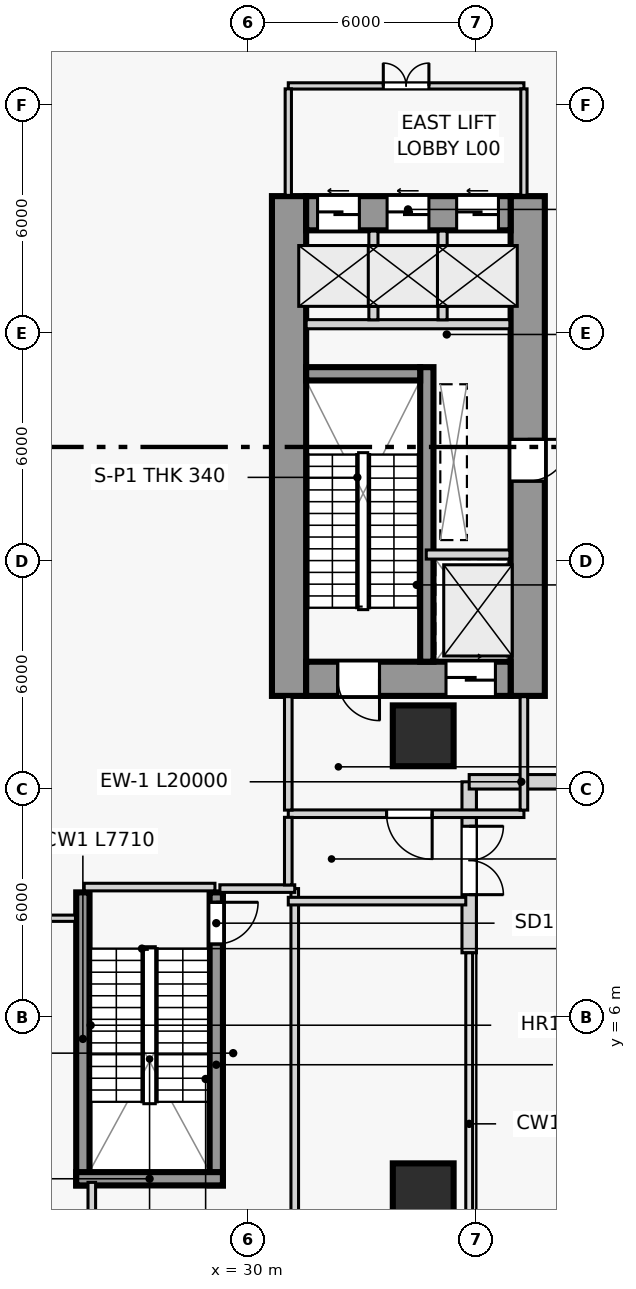
"""IFC4 building model, lengths in metres.
Left out: names, types, materials, properties, quantities, classifications, styles, units other than length and angle.
Written with IfcOpenShell. Run it as: python <this file> out.ifc"""

import sys

from ifc_helpers import new_model, si_unit, direction, frame, frame_2d, origin, origin_2d, place, context, subcontext, project, spatial, rectangle, extrude, source, transform, mapped, element, fill, save


model = new_model("IFC4")
c1 = context("Model", 3, precision=1e-05, world=origin(), true_north=direction((0.0, 1.0)))
c2 = subcontext(c1, "Body", "Model", "MODEL_VIEW")
j1 = project(units=[si_unit("LENGTHUNIT", "METRE"), si_unit("PLANEANGLEUNIT", "RADIAN")], contexts=[c1])
p1 = place(None, origin())
s1 = spatial("IfcSite", under=j1, at=p1, CompositionType="ELEMENT")
p2 = place(p1, origin())
s2 = spatial("IfcBuilding", under=s1, at=p2, CompositionType="ELEMENT")
p3 = place(p2, origin())
s3 = spatial("IfcBuildingStorey", under=s2, at=p3, CompositionType="ELEMENT", Elevation=0.0)
p4 = place(p3, frame((31.07, 14.45, 0.0), z_axis=(0.0, 0.0, 1.0), x_axis=(0.0, 1.0, 0.0)))
e1 = element("IfcWall", 1, at=p4, inside=s3, PredefinedType="SHEAR", context=c2, shape_type="SweptSolid", body=[
    extrude(rectangle(XDim=13.15, YDim=0.9, at=frame_2d((6.575, 0.0))), origin(), (0.0, 0.0, 1.0), 4.5),
])
p5 = place(p3, frame((37.35, 14.45, 0.0), z_axis=(0.0, 0.0, 1.0), x_axis=(0.0, 1.0, 0.0)))
e2 = element("IfcWall", 2, at=p5, inside=s3, PredefinedType="SHEAR", context=c2, shape_type="SweptSolid", body=[
    extrude(rectangle(XDim=13.15, YDim=0.9, at=frame_2d((6.575, 0.0))), origin(), (0.0, 0.0, 1.0), 4.5),
])
p6 = place(p5, frame((5.65, 0.0, 0.0)))
e3 = element("IfcOpeningElement", 3, at=p6, cuts=e2, PredefinedType="OPENING", context=c2, shape_type="SweptSolid", body=[
    extrude(rectangle(XDim=1.1, YDim=2.2, at=frame_2d((0.55, 1.1))), frame((0.0, 0.46, 0.0), z_axis=(0.0, -1.0, 0.0), x_axis=(1.0, 0.0, 0.0)), (0.0, 0.0, 1.0), 0.92),
])
p7 = place(p3, frame((31.52, 14.9, 0.0), z_axis=(0.0, 0.0, 1.0), x_axis=(1.0, 0.0, 0.0)))
e4 = element("IfcWall", 4, at=p7, inside=s3, PredefinedType="SHEAR", context=c2, shape_type="SweptSolid", body=[
    extrude(rectangle(XDim=5.38, YDim=0.9, at=frame_2d((2.69, 0.0))), origin(), (0.0, 0.0, 1.0), 4.5),
])
p8 = place(p7, frame((0.83, 0.0, 0.0)))
e5 = element("IfcOpeningElement", 5, at=p8, cuts=e4, PredefinedType="OPENING", context=c2, shape_type="SweptSolid", body=[
    extrude(rectangle(XDim=1.1, YDim=2.2, at=frame_2d((0.55, 1.1))), frame((0.0, 0.46, 0.0), z_axis=(0.0, -1.0, 0.0), x_axis=(1.0, 0.0, 0.0)), (0.0, 0.0, 1.0), 0.92),
])
p9 = place(p7, frame((3.68, 0.0, 0.0)))
e6 = element("IfcOpeningElement", 6, at=p9, cuts=e4, PredefinedType="OPENING", context=c2, shape_type="SweptSolid", body=[
    extrude(rectangle(XDim=1.3, YDim=2.2, at=frame_2d((0.65, 1.1))), frame((0.0, 0.46, 0.0), z_axis=(0.0, -1.0, 0.0), x_axis=(1.0, 0.0, 0.0)), (0.0, 0.0, 1.0), 0.92),
])
p10 = place(p3, frame((31.52, 27.15, 0.0), z_axis=(0.0, 0.0, 1.0), x_axis=(1.0, 0.0, 0.0)))
e7 = element("IfcWall", 7, at=p10, inside=s3, PredefinedType="SHEAR", context=c2, shape_type="SweptSolid", body=[
    extrude(rectangle(XDim=5.38, YDim=0.9, at=frame_2d((2.69, 0.0))), origin(), (0.0, 0.0, 1.0), 4.5),
])
p11 = place(p10, frame((0.3, 0.0, 0.0)))
e8 = element("IfcOpeningElement", 8, at=p11, cuts=e7, PredefinedType="OPENING", context=c2, shape_type="SweptSolid", body=[
    extrude(rectangle(XDim=1.1, YDim=2.2, at=frame_2d((0.55, 1.1))), frame((0.0, 0.46, 0.0), z_axis=(0.0, -1.0, 0.0), x_axis=(1.0, 0.0, 0.0)), (0.0, 0.0, 1.0), 0.92),
])
p12 = place(p10, frame((2.13, 0.0, 0.0)))
e9 = element("IfcOpeningElement", 9, at=p12, cuts=e7, PredefinedType="OPENING", context=c2, shape_type="SweptSolid", body=[
    extrude(rectangle(XDim=1.1, YDim=2.2, at=frame_2d((0.55, 1.1))), frame((0.0, 0.46, 0.0), z_axis=(0.0, -1.0, 0.0), x_axis=(1.0, 0.0, 0.0)), (0.0, 0.0, 1.0), 0.92),
])
p13 = place(p10, frame((3.96, 0.0, 0.0)))
e10 = element("IfcOpeningElement", 10, at=p13, cuts=e7, PredefinedType="OPENING", context=c2, shape_type="SweptSolid", body=[
    extrude(rectangle(XDim=1.1, YDim=2.2, at=frame_2d((0.55, 1.1))), frame((0.0, 0.46, 0.0), z_axis=(0.0, -1.0, 0.0), x_axis=(1.0, 0.0, 0.0)), (0.0, 0.0, 1.0), 0.92),
])
p14 = place(p3, frame((34.695, 15.35, 0.0), z_axis=(0.0, 0.0, 1.0), x_axis=(0.0, 1.0, 0.0)))
e11 = element("IfcWall", 11, at=p14, inside=s3, PredefinedType="SHEAR", context=c2, shape_type="SweptSolid", body=[
    extrude(rectangle(XDim=7.75, YDim=0.35, at=frame_2d((3.875, 0.0))), origin(), (0.0, 0.0, 1.0), 4.5),
])
p15 = place(p3, frame((31.52, 22.925, 0.0), z_axis=(0.0, 0.0, 1.0), x_axis=(1.0, 0.0, 0.0)))
e12 = element("IfcWall", 12, at=p15, inside=s3, PredefinedType="SHEAR", context=c2, shape_type="SweptSolid", body=[
    extrude(rectangle(XDim=3.0, YDim=0.35, at=frame_2d((1.5, 0.0))), origin(), (0.0, 0.0, 1.0), 4.5),
])
p16 = place(p3, frame((25.645, 1.57, 0.0), z_axis=(0.0, 0.0, 1.0), x_axis=(0.0, 1.0, 0.0)))
e13 = element("IfcWall", 13, at=p16, inside=s3, PredefinedType="SHEAR", context=c2, shape_type="SweptSolid", body=[
    extrude(rectangle(XDim=7.71, YDim=0.35, at=frame_2d((3.855, 0.0))), origin(), (0.0, 0.0, 1.0), 4.5),
])
p17 = place(p3, frame((29.155, 1.57, 0.0), z_axis=(0.0, 0.0, 1.0), x_axis=(0.0, 1.0, 0.0)))
e14 = element("IfcWall", 14, at=p17, inside=s3, PredefinedType="SHEAR", context=c2, shape_type="SweptSolid", body=[
    extrude(rectangle(XDim=7.71, YDim=0.35, at=frame_2d((3.855, 0.0))), origin(), (0.0, 0.0, 1.0), 4.5),
])
p18 = place(p17, frame((6.35, 0.0, 0.0)))
e15 = element("IfcOpeningElement", 15, at=p18, cuts=e14, PredefinedType="OPENING", context=c2, shape_type="SweptSolid", body=[
    extrude(rectangle(XDim=1.1, YDim=2.2, at=frame_2d((0.55, 1.1))), frame((0.0, 0.185, 0.0), z_axis=(0.0, -1.0, 0.0), x_axis=(1.0, 0.0, 0.0)), (0.0, 0.0, 1.0), 0.37),
])
p19 = place(p3, frame((25.47, 1.745, 0.0), z_axis=(0.0, 0.0, 1.0), x_axis=(1.0, 0.0, 0.0)))
e16 = element("IfcWall", 16, at=p19, inside=s3, PredefinedType="SHEAR", context=c2, shape_type="SweptSolid", body=[
    extrude(rectangle(XDim=3.86, YDim=0.35, at=frame_2d((1.93, 0.0))), origin(), (0.0, 0.0, 1.0), 4.5),
])
m1 = source(origin(), c2, "Body", "SweptSolid", [
    extrude(rectangle(XDim=1.6, YDim=1.6, at=origin_2d()), origin(), (0.0, 0.0, 1.0), 4.5),
])
for number, where, z_axis, x_axis in (
    (17, (34.6, 1.35, 0.0), (0.0, 0.0, 1.0), (1.0, 0.0, 0.0)),
    (18, (34.6, 13.4, 0.0), (0.0, 0.0, 1.0), (1.0, 0.0, 0.0)),
):
    element("IfcColumn", number, at=place(p3, frame(where, z_axis=z_axis, x_axis=x_axis)), inside=s3, PredefinedType="COLUMN", context=c2, shape_type="MappedRepresentation", body=[
        mapped(m1, transform((0.0, 0.0, 0.0), scale=1.0)),
    ])
p20 = place(p3, frame((35.81, 7.69, 0.0), z_axis=(0.0, 0.0, 1.0), x_axis=(0.0, 1.0, 0.0)))
e19 = element("IfcWall", 19, at=p20, inside=s3, PredefinedType="SOLIDWALL", context=c2, shape_type="SweptSolid", body=[
    extrude(rectangle(XDim=4.5, YDim=0.38, at=frame_2d((2.25, 0.0))), origin(), (0.0, 0.0, 1.0), 4.16),
])
p21 = place(p20, frame((1.53, 0.0, 0.0)))
e20 = element("IfcOpeningElement", 20, at=p21, cuts=e19, PredefinedType="OPENING", context=c2, shape_type="SweptSolid", body=[
    extrude(rectangle(XDim=1.8, YDim=2.4, at=frame_2d((0.9, 1.2))), frame((0.0, 0.2, 0.0), z_axis=(0.0, -1.0, 0.0), x_axis=(1.0, 0.0, 0.0)), (0.0, 0.0, 1.0), 0.4),
])
p22 = place(p3, frame((35.81, 12.19, 0.0), z_axis=(0.0, 0.0, 1.0), x_axis=(1.0, 0.0, 0.0)))
e21 = element("IfcWall", 21, at=p22, inside=s3, PredefinedType="SOLIDWALL", context=c2, shape_type="SweptSolid", body=[
    extrude(rectangle(XDim=20.0, YDim=0.38, at=frame_2d((10.0, 0.0))), origin(), (0.0, 0.0, 1.0), 4.16),
])
p23 = place(p22, frame((2.742, 0.0, 0.8)))
e22 = element("IfcOpeningElement", 22, at=p23, cuts=e21, PredefinedType="OPENING", context=c2, shape_type="SweptSolid", body=[
    extrude(rectangle(XDim=2.4, YDim=2.1, at=frame_2d((1.2, 1.05))), frame((0.0, 0.2, 0.0), z_axis=(0.0, -1.0, 0.0), x_axis=(1.0, 0.0, 0.0)), (0.0, 0.0, 1.0), 0.4),
])
p24 = place(p22, frame((7.228, 0.0, 0.8)))
e23 = element("IfcOpeningElement", 23, at=p24, cuts=e21, PredefinedType="OPENING", context=c2, shape_type="SweptSolid", body=[
    extrude(rectangle(XDim=2.4, YDim=2.1, at=frame_2d((1.2, 1.05))), frame((0.0, 0.2, 0.0), z_axis=(0.0, -1.0, 0.0), x_axis=(1.0, 0.0, 0.0)), (0.0, 0.0, 1.0), 0.4),
])
p25 = place(p22, frame((11.712, 0.0, 0.8)))
e24 = element("IfcOpeningElement", 24, at=p25, cuts=e21, PredefinedType="OPENING", context=c2, shape_type="SweptSolid", body=[
    extrude(rectangle(XDim=2.4, YDim=2.1, at=frame_2d((1.2, 1.05))), frame((0.0, 0.2, 0.0), z_axis=(0.0, -1.0, 0.0), x_axis=(1.0, 0.0, 0.0)), (0.0, 0.0, 1.0), 0.4),
])
p26 = place(p22, frame((16.198, 0.0, 0.8)))
e25 = element("IfcOpeningElement", 25, at=p26, cuts=e21, PredefinedType="OPENING", context=c2, shape_type="SweptSolid", body=[
    extrude(rectangle(XDim=2.4, YDim=2.1, at=frame_2d((1.2, 1.05))), frame((0.0, 0.2, 0.0), z_axis=(0.0, -1.0, 0.0), x_axis=(1.0, 0.0, 0.0)), (0.0, 0.0, 1.0), 0.4),
])
p27 = place(p3, frame((34.68, 18.17, 0.0), z_axis=(0.0, 0.0, 1.0), x_axis=(1.0, 0.0, 0.0)))
e26 = element("IfcWall", 26, at=p27, inside=s3, PredefinedType="PARTITIONING", context=c2, shape_type="SweptSolid", body=[
    extrude(rectangle(XDim=2.2, YDim=0.24, at=frame_2d((1.1, 0.0))), origin(), (0.0, 0.0, 1.0), 4.16),
])
p28 = place(p3, frame((31.05, 11.35, 0.0), z_axis=(0.0, 0.0, 1.0), x_axis=(1.0, 0.0, 0.0)))
e27 = element("IfcWall", 27, at=p28, inside=s3, PredefinedType="PARTITIONING", context=c2, shape_type="SweptSolid", body=[
    extrude(rectangle(XDim=6.2, YDim=0.2, at=frame_2d((3.1, 0.0))), origin(), (0.0, 0.0, 1.0), 4.16),
])
p29 = place(p28, frame((2.586, 0.0, 0.0)))
e28 = element("IfcOpeningElement", 28, at=p29, cuts=e27, PredefinedType="OPENING", context=c2, shape_type="SweptSolid", body=[
    extrude(rectangle(XDim=1.2, YDim=2.2, at=frame_2d((0.6, 1.1))), frame((0.0, 0.11, 0.0), z_axis=(0.0, -1.0, 0.0), x_axis=(1.0, 0.0, 0.0)), (0.0, 0.0, 1.0), 0.22),
])
for number, where, z_axis, x_axis in (
    (29, (31.05, 11.445, 0.0), (0.0, 0.0, 1.0), (0.0, 1.0, 0.0)),
    (30, (37.25, 11.445, 0.0), (0.0, 0.0, 1.0), (0.0, 1.0, 0.0)),
):
    element("IfcWall", number, at=place(p3, frame(where, z_axis=z_axis, x_axis=x_axis)), inside=s3, PredefinedType="PARTITIONING", context=c2, shape_type="SweptSolid", body=[
        extrude(rectangle(XDim=2.985, YDim=0.2, at=frame_2d((1.492, 0.0))), origin(), (0.0, 0.0, 1.0), 4.16),
    ])
p30 = place(p3, frame((31.52, 24.23, 0.0), z_axis=(0.0, 0.0, 1.0), x_axis=(1.0, 0.0, 0.0)))
e31 = element("IfcWall", 31, at=p30, inside=s3, PredefinedType="PARTITIONING", context=c2, shape_type="SweptSolid", body=[
    extrude(rectangle(XDim=5.36, YDim=0.24, at=frame_2d((2.68, 0.0))), origin(), (0.0, 0.0, 1.0), 4.16),
])
for number, where, z_axis, x_axis in (
    (32, (33.29, 24.345, 0.0), (0.0, 0.0, 1.0), (0.0, 1.0, 0.0)),
    (33, (35.11, 24.345, 0.0), (0.0, 0.0, 1.0), (0.0, 1.0, 0.0)),
):
    element("IfcWall", number, at=place(p3, frame(where, z_axis=z_axis, x_axis=x_axis)), inside=s3, PredefinedType="PARTITIONING", context=c2, shape_type="SweptSolid", body=[
        extrude(rectangle(XDim=2.335, YDim=0.24, at=frame_2d((1.167, 0.0))), origin(), (0.0, 0.0, 1.0), 4.16),
    ])
p31 = place(p3, frame((31.05, 30.5, 0.0), z_axis=(0.0, 0.0, 1.0), x_axis=(1.0, 0.0, 0.0)))
e34 = element("IfcWall", 34, at=p31, inside=s3, PredefinedType="PARTITIONING", context=c2, shape_type="SweptSolid", body=[
    extrude(rectangle(XDim=6.2, YDim=0.165, at=frame_2d((3.1, 0.0))), origin(), (0.0, 0.0, 1.0), 4.16),
])
p32 = place(p31, frame((2.5, 0.0, 0.0)))
e35 = element("IfcOpeningElement", 35, at=p32, cuts=e34, PredefinedType="OPENING", context=c2, shape_type="SweptSolid", body=[
    extrude(rectangle(XDim=1.2, YDim=2.2, at=frame_2d((0.6, 1.1))), frame((0.0, 0.093, 0.0), z_axis=(0.0, -1.0, 0.0), x_axis=(1.0, 0.0, 0.0)), (0.0, 0.0, 1.0), 0.185),
])
for number, where, z_axis, x_axis in (
    (36, (31.05, 27.62, 0.0), (0.0, 0.0, 1.0), (0.0, 1.0, 0.0)),
    (37, (37.25, 27.62, 0.0), (0.0, 0.0, 1.0), (0.0, 1.0, 0.0)),
):
    element("IfcWall", number, at=place(p3, frame(where, z_axis=z_axis, x_axis=x_axis)), inside=s3, PredefinedType="PARTITIONING", context=c2, shape_type="SweptSolid", body=[
        extrude(rectangle(XDim=2.802, YDim=0.165, at=frame_2d((1.401, 0.0))), origin(), (0.0, 0.0, 1.0), 4.16),
    ])
p33 = place(p3, frame((25.68, 9.42, 0.0), z_axis=(0.0, 0.0, 1.0), x_axis=(1.0, 0.0, 0.0)))
e38 = element("IfcWall", 38, at=p33, inside=s3, PredefinedType="PARTITIONING", context=c2, shape_type="SweptSolid", body=[
    extrude(rectangle(XDim=3.44, YDim=0.2, at=frame_2d((1.72, 0.0))), origin(), (0.0, 0.0, 1.0), 4.16),
])
p34 = place(p3, frame((15.3, 8.6, 0.0), z_axis=(0.0, 0.0, 1.0), x_axis=(1.0, 0.0, 0.0)))
e39 = element("IfcWall", 39, at=p34, inside=s3, PredefinedType="PARTITIONING", context=c2, shape_type="SweptSolid", body=[
    extrude(rectangle(XDim=10.15, YDim=0.165, at=frame_2d((5.075, 0.0))), origin(), (0.0, 0.0, 1.0), 4.16),
])
p35 = place(p34, frame((4.475, 0.0, 0.0)))
e40 = element("IfcOpeningElement", 40, at=p35, cuts=e39, PredefinedType="OPENING", context=c2, shape_type="SweptSolid", body=[
    extrude(rectangle(XDim=1.2, YDim=2.2, at=frame_2d((0.6, 1.1))), frame((0.0, 0.093, 0.0), z_axis=(0.0, -1.0, 0.0), x_axis=(1.0, 0.0, 0.0)), (0.0, 0.0, 1.0), 0.185),
])
p36 = place(p3, frame((25.88, -5.55, 0.0), z_axis=(0.0, 0.0, 1.0), x_axis=(0.0, 1.0, 0.0)))
e41 = element("IfcWall", 41, at=p36, inside=s3, PredefinedType="PARTITIONING", context=c2, shape_type="SweptSolid", body=[
    extrude(rectangle(XDim=7.2, YDim=0.2, at=frame_2d((3.6, 0.0))), origin(), (0.0, 0.0, 1.0), 4.16),
])
p37 = place(p3, frame((31.22, -5.815, 0.0), z_axis=(0.0, 0.0, 1.0), x_axis=(0.0, 1.0, 0.0)))
e42 = element("IfcWall", 42, at=p37, inside=s3, PredefinedType="PARTITIONING", context=c2, shape_type="SweptSolid", body=[
    extrude(rectangle(XDim=15.195, YDim=0.2, at=frame_2d((7.597, 0.0))), origin(), (0.0, 0.0, 1.0), 4.16),
])
p38 = place(p3, frame((29.25, 9.38, 0.0), z_axis=(0.0, 0.0, 1.0), x_axis=(1.0, 0.0, 0.0)))
e43 = element("IfcWall", 43, at=p38, inside=s3, PredefinedType="PARTITIONING", context=c2, shape_type="SweptSolid", body=[
    extrude(rectangle(XDim=1.97, YDim=0.2, at=frame_2d((0.985, 0.0))), origin(), (0.0, 0.0, 1.0), 4.16),
])
p39 = place(p3, frame((31.05, 9.475, 0.0), z_axis=(0.0, 0.0, 1.0), x_axis=(0.0, 1.0, 0.0)))
e44 = element("IfcWall", 44, at=p39, inside=s3, PredefinedType="PARTITIONING", context=c2, shape_type="SweptSolid", body=[
    extrude(rectangle(XDim=1.78, YDim=0.2, at=frame_2d((0.89, 0.0))), origin(), (0.0, 0.0, 1.0), 4.16),
])
p40 = place(p3, frame((31.05, 9.05, 0.0), z_axis=(0.0, 0.0, 1.0), x_axis=(1.0, 0.0, 0.0)))
e45 = element("IfcWall", 45, at=p40, inside=s3, PredefinedType="PARTITIONING", context=c2, shape_type="SweptSolid", body=[
    extrude(rectangle(XDim=4.67, YDim=0.2, at=frame_2d((2.335, 0.0))), origin(), (0.0, 0.0, 1.0), 4.16),
])
m2 = source(origin(), c2, "Body", "SweptSolid", [
    extrude(rectangle(XDim=1.8, YDim=2.4, at=frame_2d((0.9, 1.2))), frame((0.0, 0.025, 0.0), z_axis=(0.0, -1.0, 0.0), x_axis=(1.0, 0.0, 0.0)), (0.0, 0.0, 1.0), 0.05),
])
p41 = place(p21, frame((1.8, 0.0, 0.0), z_axis=(0.0, 0.0, 1.0), x_axis=(-1.0, 0.0, 0.0)))
e46 = element("IfcDoor", 46, at=p41, inside=s3, OperationType="DOUBLE_DOOR_SINGLE_SWING", PredefinedType="DOOR", context=c2, shape_type="MappedRepresentation", body=[
    mapped(m2, transform((0.0, 0.0, 0.0), scale=1.0)),
])
fill(e20, e46)
m3 = source(origin(), c2, "Body", "SweptSolid", [
    extrude(rectangle(XDim=1.1, YDim=2.2, at=frame_2d((0.55, 1.1))), frame((0.0, 0.025, 0.0), z_axis=(0.0, -1.0, 0.0), x_axis=(1.0, 0.0, 0.0)), (0.0, 0.0, 1.0), 0.05),
])
p42 = place(p8, frame((1.1, 0.0, 0.0), z_axis=(0.0, 0.0, 1.0), x_axis=(-1.0, 0.0, 0.0)))
e47 = element("IfcDoor", 47, at=p42, inside=s3, OperationType="SINGLE_SWING_LEFT", PredefinedType="DOOR", context=c2, shape_type="MappedRepresentation", body=[
    mapped(m3, transform((0.0, 0.0, 0.0), scale=1.0)),
])
fill(e5, e47)
m4 = source(origin(), c2, "Body", "SweptSolid", [
    extrude(rectangle(XDim=1.3, YDim=2.2, at=frame_2d((0.65, 1.1))), frame((0.0, 0.025, 0.0), z_axis=(0.0, -1.0, 0.0), x_axis=(1.0, 0.0, 0.0)), (0.0, 0.0, 1.0), 0.05),
])
p43 = place(p9, origin())
e48 = element("IfcDoor", 48, at=p43, inside=s3, OperationType="SLIDING_TO_RIGHT", PredefinedType="DOOR", context=c2, shape_type="MappedRepresentation", body=[
    mapped(m4, transform((0.0, 0.0, 0.0), scale=1.0)),
])
fill(e6, e48)
m5 = source(origin(), c2, "Body", "SweptSolid", [
    extrude(rectangle(XDim=1.2, YDim=2.2, at=frame_2d((0.6, 1.1))), frame((0.0, 0.025, 0.0), z_axis=(0.0, -1.0, 0.0), x_axis=(1.0, 0.0, 0.0)), (0.0, 0.0, 1.0), 0.05),
])
p44 = place(p29, frame((1.2, 0.0, 0.0), z_axis=(0.0, 0.0, 1.0), x_axis=(-1.0, 0.0, 0.0)))
e49 = element("IfcDoor", 49, at=p44, inside=s3, OperationType="SINGLE_SWING_LEFT", PredefinedType="DOOR", context=c2, shape_type="MappedRepresentation", body=[
    mapped(m5, transform((0.0, 0.0, 0.0), scale=1.0)),
])
fill(e28, e49)
m6 = source(origin(), c2, "Body", "SweptSolid", [
    extrude(rectangle(XDim=1.1, YDim=2.2, at=frame_2d((0.55, 1.1))), frame((0.0, 0.025, 0.0), z_axis=(0.0, -1.0, 0.0), x_axis=(1.0, 0.0, 0.0)), (0.0, 0.0, 1.0), 0.05),
])
p45 = place(p11, origin())
e50 = element("IfcDoor", 50, at=p45, inside=s3, OperationType="SLIDING_TO_LEFT", PredefinedType="DOOR", context=c2, shape_type="MappedRepresentation", body=[
    mapped(m6, transform((0.0, 0.0, 0.0), scale=1.0)),
])
fill(e8, e50)
p46 = place(p12, origin())
e51 = element("IfcDoor", 51, at=p46, inside=s3, OperationType="SLIDING_TO_LEFT", PredefinedType="DOOR", context=c2, shape_type="MappedRepresentation", body=[
    mapped(m6, transform((0.0, 0.0, 0.0), scale=1.0)),
])
fill(e9, e51)
p47 = place(p13, origin())
e52 = element("IfcDoor", 52, at=p47, inside=s3, OperationType="SLIDING_TO_LEFT", PredefinedType="DOOR", context=c2, shape_type="MappedRepresentation", body=[
    mapped(m6, transform((0.0, 0.0, 0.0), scale=1.0)),
])
fill(e10, e52)
p48 = place(p32, origin())
e53 = element("IfcDoor", 53, at=p48, inside=s3, OperationType="DOUBLE_DOOR_SINGLE_SWING", PredefinedType="DOOR", context=c2, shape_type="MappedRepresentation", body=[
    mapped(m5, transform((0.0, 0.0, 0.0), scale=1.0)),
])
fill(e35, e53)
p49 = place(p6, frame((1.1, 0.0, 0.0), z_axis=(0.0, 0.0, 1.0), x_axis=(-1.0, 0.0, 0.0)))
e54 = element("IfcDoor", 54, at=p49, inside=s3, OperationType="SINGLE_SWING_LEFT", PredefinedType="DOOR", context=c2, shape_type="MappedRepresentation", body=[
    mapped(m3, transform((0.0, 0.0, 0.0), scale=1.0)),
])
fill(e3, e54)
p50 = place(p18, frame((1.1, 0.0, 0.0), z_axis=(0.0, 0.0, 1.0), x_axis=(-1.0, 0.0, 0.0)))
e55 = element("IfcDoor", 55, at=p50, inside=s3, OperationType="SINGLE_SWING_LEFT", PredefinedType="DOOR", context=c2, shape_type="MappedRepresentation", body=[
    mapped(m3, transform((0.0, 0.0, 0.0), scale=1.0)),
])
fill(e15, e55)
save(model, sys.argv[1])
